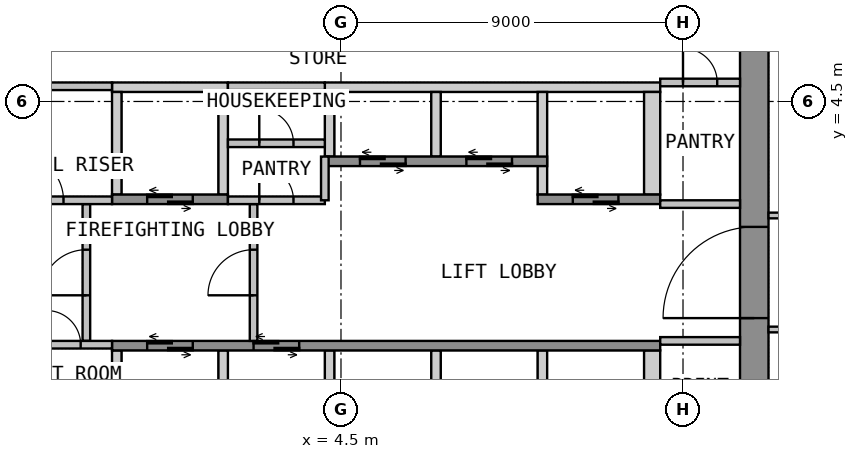
"""IFC4 building model, lengths in metres.
Left out: names, types, materials, properties, quantities, classifications, styles, units other than length and angle.
Written with IfcOpenShell. Run it as: python <this file> out.ifc"""

import sys

from ifc_helpers import new_model, si_unit, direction, frame, frame_2d, origin, place, context, subcontext, project, spatial, polyline, rectangle, outline, extrude, element, fill, save


model = new_model("IFC4")
c1 = context("Model", 3, precision=1e-05, world=origin(), true_north=direction((0.0, 1.0)))
c2 = subcontext(c1, "Body", "Model", "MODEL_VIEW")
j1 = project(units=[si_unit("LENGTHUNIT", "METRE"), si_unit("PLANEANGLEUNIT", "RADIAN")], contexts=[c1])
p1 = place(None, origin())
s1 = spatial("IfcSite", under=j1, at=p1, CompositionType="ELEMENT")
p2 = place(p1, origin())
s2 = spatial("IfcBuilding", under=s1, at=p2, CompositionType="ELEMENT")
p3 = place(p2, frame((0.0, 0.0, 144.3)))
s3 = spatial("IfcBuildingStorey", under=s2, at=p3, CompositionType="ELEMENT", Elevation=144.3)
p4 = place(p3, frame((15.375, -12.75, 0.0), z_axis=(0.0, 0.0, 1.0), x_axis=(0.0, 1.0, 0.0)))
e1 = element("IfcWall", 1, at=p4, inside=s3, PredefinedType="SHEAR", context=c2, shape_type="SweptSolid", body=[
    extrude(rectangle(XDim=25.5, YDim=0.75, at=frame_2d((12.75, 0.0))), origin(), (0.0, 0.0, 1.0), 3.575),
])
p5 = place(p4, frame((11.55, 0.0, 0.0)))
e2 = element("IfcOpeningElement", 2, at=p5, cuts=e1, PredefinedType="OPENING", context=c2, shape_type="SweptSolid", body=[
    extrude(rectangle(XDim=2.4, YDim=2.1, at=frame_2d((1.2, 1.05))), frame((0.0, 0.385, 0.0), z_axis=(0.0, -1.0, 0.0), x_axis=(1.0, 0.0, 0.0)), (0.0, 0.0, 1.0), 0.77),
])
p6 = place(p3, origin())
e3 = element("IfcWall", 3, at=p6, inside=s3, PredefinedType="SHEAR", context=c2, shape_type="SweptSolid", body=[
    extrude(outline(polyline([(-1.525, 4.75), (1.525, 4.75), (1.525, 5.0), (-1.525, 5.0), (-1.525, 4.75)])), origin(), (0.0, 0.0, 1.0), 3.575),
])
p7 = place(p3, origin())
e4 = element("IfcWall", 4, at=p7, inside=s3, PredefinedType="SHEAR", context=c2, shape_type="SweptSolid", body=[
    extrude(outline(polyline([(4.075, 4.75), (12.9, 4.75), (12.9, 5.0), (4.075, 5.0), (4.075, 4.75)])), origin(), (0.0, 0.0, 1.0), 3.575),
])
p8 = place(p3, origin())
e5 = element("IfcWall", 5, at=p8, inside=s3, PredefinedType="SHEAR", context=c2, shape_type="SweptSolid", body=[
    extrude(outline(polyline([(-1.525, 2.05), (-1.275, 2.05), (-1.275, 4.75), (-1.525, 4.75), (-1.525, 2.05)])), origin(), (0.0, 0.0, 1.0), 3.575),
])
p9 = place(p3, origin())
e6 = element("IfcWall", 6, at=p9, inside=s3, PredefinedType="SHEAR", context=c2, shape_type="SweptSolid", body=[
    extrude(outline(polyline([(1.275, 2.05), (1.525, 2.05), (1.525, 4.75), (1.275, 4.75), (1.275, 2.05)])), origin(), (0.0, 0.0, 1.0), 3.575),
])
p10 = place(p3, origin())
e7 = element("IfcWall", 7, at=p10, inside=s3, PredefinedType="SHEAR", context=c2, shape_type="SweptSolid", body=[
    extrude(outline(polyline([(9.675, 2.05), (9.925, 2.05), (9.925, 4.75), (9.675, 4.75), (9.675, 2.05)])), origin(), (0.0, 0.0, 1.0), 3.575),
])
p11 = place(p3, origin())
e8 = element("IfcWall", 8, at=p11, inside=s3, PredefinedType="SHEAR", context=c2, shape_type="SweptSolid", body=[
    extrude(outline(polyline([(12.475, 2.05), (12.9, 2.05), (12.9, 4.75), (12.475, 4.75), (12.475, 2.05)])), origin(), (0.0, 0.0, 1.0), 3.575),
])
p12 = place(p3, origin())
e9 = element("IfcWall", 9, at=p12, inside=s3, PredefinedType="SHEAR", context=c2, shape_type="SweptSolid", body=[
    extrude(outline(polyline([(4.075, 3.05), (4.325, 3.05), (4.325, 4.75), (4.075, 4.75), (4.075, 3.05)])), origin(), (0.0, 0.0, 1.0), 3.575),
])
p13 = place(p3, origin())
e10 = element("IfcWall", 10, at=p13, inside=s3, PredefinedType="SHEAR", context=c2, shape_type="SweptSolid", body=[
    extrude(outline(polyline([(6.875, 3.05), (7.125, 3.05), (7.125, 4.75), (6.875, 4.75), (6.875, 3.05)])), origin(), (0.0, 0.0, 1.0), 3.575),
])
p14 = place(p3, frame((-1.525, 1.925, 0.0), z_axis=(0.0, 0.0, 1.0), x_axis=(1.0, 0.0, 0.0)))
e11 = element("IfcWall", 11, at=p14, inside=s3, PredefinedType="SHEAR", context=c2, shape_type="SweptSolid", body=[
    extrude(rectangle(XDim=3.05, YDim=0.25, at=frame_2d((1.525, 0.0))), origin(), (0.0, 0.0, 1.0), 3.575),
])
p15 = place(p14, frame((0.925, 0.0, 0.0)))
e12 = element("IfcOpeningElement", 12, at=p15, cuts=e11, PredefinedType="OPENING", context=c2, shape_type="SweptSolid", body=[
    extrude(rectangle(XDim=1.2, YDim=2.1, at=frame_2d((0.6, 1.05))), frame((0.0, 0.135, 0.0), z_axis=(0.0, -1.0, 0.0), x_axis=(1.0, 0.0, 0.0)), (0.0, 0.0, 1.0), 0.27),
])
p16 = place(p3, frame((4.075, 2.925, 0.0), z_axis=(0.0, 0.0, 1.0), x_axis=(1.0, 0.0, 0.0)))
e13 = element("IfcWall", 13, at=p16, inside=s3, PredefinedType="SHEAR", context=c2, shape_type="SweptSolid", body=[
    extrude(rectangle(XDim=5.85, YDim=0.25, at=frame_2d((2.925, 0.0))), origin(), (0.0, 0.0, 1.0), 3.575),
])
p17 = place(p16, frame((0.925, 0.0, 0.0)))
e14 = element("IfcOpeningElement", 14, at=p17, cuts=e13, PredefinedType="OPENING", context=c2, shape_type="SweptSolid", body=[
    extrude(rectangle(XDim=1.2, YDim=2.1, at=frame_2d((0.6, 1.05))), frame((0.0, 0.135, 0.0), z_axis=(0.0, -1.0, 0.0), x_axis=(1.0, 0.0, 0.0)), (0.0, 0.0, 1.0), 0.27),
])
p18 = place(p16, frame((3.725, 0.0, 0.0)))
e15 = element("IfcOpeningElement", 15, at=p18, cuts=e13, PredefinedType="OPENING", context=c2, shape_type="SweptSolid", body=[
    extrude(rectangle(XDim=1.2, YDim=2.1, at=frame_2d((0.6, 1.05))), frame((0.0, 0.135, 0.0), z_axis=(0.0, -1.0, 0.0), x_axis=(1.0, 0.0, 0.0)), (0.0, 0.0, 1.0), 0.27),
])
p19 = place(p3, frame((9.675, 1.925, 0.0), z_axis=(0.0, 0.0, 1.0), x_axis=(1.0, 0.0, 0.0)))
e16 = element("IfcWall", 16, at=p19, inside=s3, PredefinedType="SHEAR", context=c2, shape_type="SweptSolid", body=[
    extrude(rectangle(XDim=3.225, YDim=0.25, at=frame_2d((1.612, 0.0))), origin(), (0.0, 0.0, 1.0), 3.575),
])
p20 = place(p19, frame((0.925, 0.0, 0.0)))
e17 = element("IfcOpeningElement", 17, at=p20, cuts=e16, PredefinedType="OPENING", context=c2, shape_type="SweptSolid", body=[
    extrude(rectangle(XDim=1.2, YDim=2.1, at=frame_2d((0.6, 1.05))), frame((0.0, 0.135, 0.0), z_axis=(0.0, -1.0, 0.0), x_axis=(1.0, 0.0, 0.0)), (0.0, 0.0, 1.0), 0.27),
])
p21 = place(p3, origin())
e18 = element("IfcWall", 18, at=p21, inside=s3, PredefinedType="SHEAR", context=c2, shape_type="SweptSolid", body=[
    extrude(outline(polyline([(-1.525, -4.75), (-1.275, -4.75), (-1.275, -2.05), (-1.525, -2.05), (-1.525, -4.75)])), origin(), (0.0, 0.0, 1.0), 3.575),
])
p22 = place(p3, origin())
e19 = element("IfcWall", 19, at=p22, inside=s3, PredefinedType="SHEAR", context=c2, shape_type="SweptSolid", body=[
    extrude(outline(polyline([(1.275, -4.75), (1.525, -4.75), (1.525, -2.05), (1.275, -2.05), (1.275, -4.75)])), origin(), (0.0, 0.0, 1.0), 3.575),
])
p23 = place(p3, origin())
e20 = element("IfcWall", 20, at=p23, inside=s3, PredefinedType="SHEAR", context=c2, shape_type="SweptSolid", body=[
    extrude(outline(polyline([(4.075, -4.75), (4.325, -4.75), (4.325, -2.05), (4.075, -2.05), (4.075, -4.75)])), origin(), (0.0, 0.0, 1.0), 3.575),
])
p24 = place(p3, origin())
e21 = element("IfcWall", 21, at=p24, inside=s3, PredefinedType="SHEAR", context=c2, shape_type="SweptSolid", body=[
    extrude(outline(polyline([(6.875, -4.75), (7.125, -4.75), (7.125, -2.05), (6.875, -2.05), (6.875, -4.75)])), origin(), (0.0, 0.0, 1.0), 3.575),
])
p25 = place(p3, origin())
e22 = element("IfcWall", 22, at=p25, inside=s3, PredefinedType="SHEAR", context=c2, shape_type="SweptSolid", body=[
    extrude(outline(polyline([(9.675, -4.75), (9.925, -4.75), (9.925, -2.05), (9.675, -2.05), (9.675, -4.75)])), origin(), (0.0, 0.0, 1.0), 3.575),
])
p26 = place(p3, origin())
e23 = element("IfcWall", 23, at=p26, inside=s3, PredefinedType="SHEAR", context=c2, shape_type="SweptSolid", body=[
    extrude(outline(polyline([(12.475, -4.75), (12.9, -4.75), (12.9, -2.05), (12.475, -2.05), (12.475, -4.75)])), origin(), (0.0, 0.0, 1.0), 3.575),
])
p27 = place(p3, frame((-1.525, -1.925, 0.0), z_axis=(0.0, 0.0, 1.0), x_axis=(1.0, 0.0, 0.0)))
e24 = element("IfcWall", 24, at=p27, inside=s3, PredefinedType="SHEAR", context=c2, shape_type="SweptSolid", body=[
    extrude(rectangle(XDim=14.425, YDim=0.25, at=frame_2d((7.212, 0.0))), origin(), (0.0, 0.0, 1.0), 3.575),
])
p28 = place(p27, frame((0.925, 0.0, 0.0)))
e25 = element("IfcOpeningElement", 25, at=p28, cuts=e24, PredefinedType="OPENING", context=c2, shape_type="SweptSolid", body=[
    extrude(rectangle(XDim=1.2, YDim=2.1, at=frame_2d((0.6, 1.05))), frame((0.0, 0.135, 0.0), z_axis=(0.0, -1.0, 0.0), x_axis=(1.0, 0.0, 0.0)), (0.0, 0.0, 1.0), 0.27),
])
p29 = place(p27, frame((3.725, 0.0, 0.0)))
e26 = element("IfcOpeningElement", 26, at=p29, cuts=e24, PredefinedType="OPENING", context=c2, shape_type="SweptSolid", body=[
    extrude(rectangle(XDim=1.2, YDim=2.1, at=frame_2d((0.6, 1.05))), frame((0.0, 0.135, 0.0), z_axis=(0.0, -1.0, 0.0), x_axis=(1.0, 0.0, 0.0)), (0.0, 0.0, 1.0), 0.27),
])
p30 = place(p3, frame((-2.2, -1.8, 0.0), z_axis=(0.0, 0.0, 1.0), x_axis=(0.0, 1.0, 0.0)))
e27 = element("IfcWall", 27, at=p30, inside=s3, PredefinedType="PARTITIONING", context=c2, shape_type="SweptSolid", body=[
    extrude(rectangle(XDim=3.6, YDim=0.2, at=frame_2d((1.8, 0.0))), origin(), (0.0, 0.0, 1.0), 3.575),
])
p31 = place(p30, frame((1.2, 0.0, 0.0)))
e28 = element("IfcOpeningElement", 28, at=p31, cuts=e27, PredefinedType="OPENING", context=c2, shape_type="SweptSolid", body=[
    extrude(rectangle(XDim=1.2, YDim=2.1, at=frame_2d((0.6, 1.05))), frame((0.0, 0.11, 0.0), z_axis=(0.0, -1.0, 0.0), x_axis=(1.0, 0.0, 0.0)), (0.0, 0.0, 1.0), 0.22),
])
p32 = place(p3, frame((2.2, -1.8, 0.0), z_axis=(0.0, 0.0, 1.0), x_axis=(0.0, 1.0, 0.0)))
e29 = element("IfcWall", 29, at=p32, inside=s3, PredefinedType="PARTITIONING", context=c2, shape_type="SweptSolid", body=[
    extrude(rectangle(XDim=3.6, YDim=0.2, at=frame_2d((1.8, 0.0))), origin(), (0.0, 0.0, 1.0), 3.575),
])
p33 = place(p32, frame((1.2, 0.0, 0.0)))
e30 = element("IfcOpeningElement", 30, at=p33, cuts=e29, PredefinedType="OPENING", context=c2, shape_type="SweptSolid", body=[
    extrude(rectangle(XDim=1.2, YDim=2.1, at=frame_2d((0.6, 1.05))), frame((0.0, 0.11, 0.0), z_axis=(0.0, -1.0, 0.0), x_axis=(1.0, 0.0, 0.0)), (0.0, 0.0, 1.0), 0.22),
])
p34 = place(p3, frame((12.9, 5.0, 0.0), z_axis=(0.0, 0.0, 1.0), x_axis=(1.0, 0.0, 0.0)))
e31 = element("IfcWall", 31, at=p34, inside=s3, PredefinedType="PARTITIONING", context=c2, shape_type="SweptSolid", body=[
    extrude(rectangle(XDim=2.1, YDim=0.2, at=frame_2d((1.05, 0.0))), origin(), (0.0, 0.0, 1.0), 3.575),
])
p35 = place(p34, frame((0.6, 0.0, 0.0)))
e32 = element("IfcOpeningElement", 32, at=p35, cuts=e31, PredefinedType="OPENING", context=c2, shape_type="SweptSolid", body=[
    extrude(rectangle(XDim=0.9, YDim=2.1, at=frame_2d((0.45, 1.05))), frame((0.0, 0.11, 0.0), z_axis=(0.0, -1.0, 0.0), x_axis=(1.0, 0.0, 0.0)), (0.0, 0.0, 1.0), 0.22),
])
for number, where, z_axis, x_axis in (
    (33, (12.9, 1.8, 0.0), (0.0, 0.0, 1.0), (1.0, 0.0, 0.0)),
    (34, (12.9, -1.8, 0.0), (0.0, 0.0, 1.0), (1.0, 0.0, 0.0)),
):
    element("IfcWall", number, at=place(p3, frame(where, z_axis=z_axis, x_axis=x_axis)), inside=s3, PredefinedType="PARTITIONING", context=c2, shape_type="SweptSolid", body=[
        extrude(rectangle(XDim=2.1, YDim=0.2, at=frame_2d((1.05, 0.0))), origin(), (0.0, 0.0, 1.0), 3.575),
    ])
p36 = place(p3, frame((-12.9, 1.9, 0.0), z_axis=(0.0, 0.0, 1.0), x_axis=(1.0, 0.0, 0.0)))
e35 = element("IfcWall", 35, at=p36, inside=s3, PredefinedType="PARTITIONING", context=c2, shape_type="SweptSolid", body=[
    extrude(rectangle(XDim=11.375, YDim=0.2, at=frame_2d((5.688, 0.0))), origin(), (0.0, 0.0, 1.0), 3.575),
])
p37 = place(p36, frame((1.334, 0.0, 0.0)))
e36 = element("IfcOpeningElement", 36, at=p37, cuts=e35, PredefinedType="OPENING", context=c2, shape_type="SweptSolid", body=[
    extrude(rectangle(XDim=1.2, YDim=2.1, at=frame_2d((0.6, 1.05))), frame((0.0, 0.11, 0.0), z_axis=(0.0, -1.0, 0.0), x_axis=(1.0, 0.0, 0.0)), (0.0, 0.0, 1.0), 0.22),
])
p38 = place(p36, frame((5.144, 0.0, 0.0)))
e37 = element("IfcOpeningElement", 37, at=p38, cuts=e35, PredefinedType="OPENING", context=c2, shape_type="SweptSolid", body=[
    extrude(rectangle(XDim=1.2, YDim=2.1, at=frame_2d((0.6, 1.05))), frame((0.0, 0.11, 0.0), z_axis=(0.0, -1.0, 0.0), x_axis=(1.0, 0.0, 0.0)), (0.0, 0.0, 1.0), 0.22),
])
p39 = place(p36, frame((8.898, 0.0, 0.0)))
e38 = element("IfcOpeningElement", 38, at=p39, cuts=e35, PredefinedType="OPENING", context=c2, shape_type="SweptSolid", body=[
    extrude(rectangle(XDim=1.2, YDim=2.1, at=frame_2d((0.6, 1.05))), frame((0.0, 0.11, 0.0), z_axis=(0.0, -1.0, 0.0), x_axis=(1.0, 0.0, 0.0)), (0.0, 0.0, 1.0), 0.22),
])
p40 = place(p3, frame((-12.9, 4.9, 0.0), z_axis=(0.0, 0.0, 1.0), x_axis=(1.0, 0.0, 0.0)))
e39 = element("IfcWall", 39, at=p40, inside=s3, PredefinedType="PARTITIONING", context=c2, shape_type="SweptSolid", body=[
    extrude(rectangle(XDim=11.375, YDim=0.2, at=frame_2d((5.688, 0.0))), origin(), (0.0, 0.0, 1.0), 3.575),
])
p41 = place(p3, frame((1.525, 3.4, 0.0), z_axis=(0.0, 0.0, 1.0), x_axis=(1.0, 0.0, 0.0)))
e40 = element("IfcWall", 40, at=p41, inside=s3, PredefinedType="PARTITIONING", context=c2, shape_type="SweptSolid", body=[
    extrude(rectangle(XDim=2.55, YDim=0.2, at=frame_2d((1.275, 0.0))), origin(), (0.0, 0.0, 1.0), 3.575),
])
p42 = place(p41, frame((0.825, 0.0, 0.0)))
e41 = element("IfcOpeningElement", 41, at=p42, cuts=e40, PredefinedType="OPENING", context=c2, shape_type="SweptSolid", body=[
    extrude(rectangle(XDim=0.9, YDim=2.1, at=frame_2d((0.45, 1.05))), frame((0.0, 0.11, 0.0), z_axis=(0.0, -1.0, 0.0), x_axis=(1.0, 0.0, 0.0)), (0.0, 0.0, 1.0), 0.22),
])
p43 = place(p3, frame((1.525, 1.9, 0.0), z_axis=(0.0, 0.0, 1.0), x_axis=(1.0, 0.0, 0.0)))
e42 = element("IfcWall", 42, at=p43, inside=s3, PredefinedType="PARTITIONING", context=c2, shape_type="SweptSolid", body=[
    extrude(rectangle(XDim=2.55, YDim=0.2, at=frame_2d((1.275, 0.0))), origin(), (0.0, 0.0, 1.0), 3.575),
])
p44 = place(p43, frame((0.825, 0.0, 0.0)))
e43 = element("IfcOpeningElement", 43, at=p44, cuts=e42, PredefinedType="OPENING", context=c2, shape_type="SweptSolid", body=[
    extrude(rectangle(XDim=0.9, YDim=2.1, at=frame_2d((0.45, 1.05))), frame((0.0, 0.11, 0.0), z_axis=(0.0, -1.0, 0.0), x_axis=(1.0, 0.0, 0.0)), (0.0, 0.0, 1.0), 0.22),
])
p45 = place(p3, frame((1.525, 4.9, 0.0), z_axis=(0.0, 0.0, 1.0), x_axis=(1.0, 0.0, 0.0)))
e44 = element("IfcWall", 44, at=p45, inside=s3, PredefinedType="PARTITIONING", context=c2, shape_type="SweptSolid", body=[
    extrude(rectangle(XDim=2.55, YDim=0.2, at=frame_2d((1.275, 0.0))), origin(), (0.0, 0.0, 1.0), 3.575),
])
p46 = place(p3, frame((4.075, 1.9, 0.0), z_axis=(0.0, 0.0, 1.0), x_axis=(0.0, 1.0, 0.0)))
e45 = element("IfcWall", 45, at=p46, inside=s3, PredefinedType="PARTITIONING", context=c2, shape_type="SweptSolid", body=[
    extrude(rectangle(XDim=1.15, YDim=0.2, at=frame_2d((0.575, 0.0))), origin(), (0.0, 0.0, 1.0), 3.575),
])
p47 = place(p3, frame((-4.075, -1.9, 0.0), z_axis=(0.0, 0.0, 1.0), x_axis=(1.0, 0.0, 0.0)))
e46 = element("IfcWall", 46, at=p47, inside=s3, PredefinedType="PARTITIONING", context=c2, shape_type="SweptSolid", body=[
    extrude(rectangle(XDim=2.55, YDim=0.2, at=frame_2d((1.275, 0.0))), origin(), (0.0, 0.0, 1.0), 3.575),
])
p48 = place(p47, frame((0.825, 0.0, 0.0)))
e47 = element("IfcOpeningElement", 47, at=p48, cuts=e46, PredefinedType="OPENING", context=c2, shape_type="SweptSolid", body=[
    extrude(rectangle(XDim=0.9, YDim=2.1, at=frame_2d((0.45, 1.05))), frame((0.0, 0.11, 0.0), z_axis=(0.0, -1.0, 0.0), x_axis=(1.0, 0.0, 0.0)), (0.0, 0.0, 1.0), 0.22),
])
for number, where, z_axis, x_axis in (
    (48, (15.75, -1.5, 0.0), (0.0, 0.0, 1.0), (1.0, 0.0, 0.0)),
    (49, (18.825, 1.5, 0.0), (0.0, 0.0, 1.0), (-1.0, 0.0, 0.0)),
):
    element("IfcWall", number, at=place(p3, frame(where, z_axis=z_axis, x_axis=x_axis)), inside=s3, PredefinedType="PARTITIONING", context=c2, shape_type="SweptSolid", body=[
        extrude(rectangle(XDim=3.075, YDim=0.15, at=frame_2d((1.538, 0.0))), origin(), (0.0, 0.0, 1.0), 3.575),
    ])
p49 = place(p5, origin())
e50 = element("IfcDoor", 50, at=p49, inside=s3, OperationType="DOUBLE_DOOR_DOUBLE_SWING", PredefinedType="DOOR", context=c2, shape_type="SweptSolid", body=[
    extrude(rectangle(XDim=2.4, YDim=2.1, at=frame_2d((1.2, 1.05))), frame((0.0, 0.025, 0.0), z_axis=(0.0, -1.0, 0.0), x_axis=(1.0, 0.0, 0.0)), (0.0, 0.0, 1.0), 0.05),
])
fill(e2, e50)
p50 = place(p15, origin())
e51 = element("IfcDoor", 51, at=p50, inside=s3, OperationType="DOUBLE_DOOR_SLIDING", PredefinedType="DOOR", context=c2, shape_type="SweptSolid", body=[
    extrude(rectangle(XDim=1.2, YDim=2.1, at=frame_2d((0.6, 1.05))), frame((0.0, 0.025, 0.0), z_axis=(0.0, -1.0, 0.0), x_axis=(1.0, 0.0, 0.0)), (0.0, 0.0, 1.0), 0.05),
])
fill(e12, e51)
p51 = place(p17, origin())
e52 = element("IfcDoor", 52, at=p51, inside=s3, OperationType="DOUBLE_DOOR_SLIDING", PredefinedType="DOOR", context=c2, shape_type="SweptSolid", body=[
    extrude(rectangle(XDim=1.2, YDim=2.1, at=frame_2d((0.6, 1.05))), frame((0.0, 0.025, 0.0), z_axis=(0.0, -1.0, 0.0), x_axis=(1.0, 0.0, 0.0)), (0.0, 0.0, 1.0), 0.05),
])
fill(e14, e52)
p52 = place(p18, origin())
e53 = element("IfcDoor", 53, at=p52, inside=s3, OperationType="DOUBLE_DOOR_SLIDING", PredefinedType="DOOR", context=c2, shape_type="SweptSolid", body=[
    extrude(rectangle(XDim=1.2, YDim=2.1, at=frame_2d((0.6, 1.05))), frame((0.0, 0.025, 0.0), z_axis=(0.0, -1.0, 0.0), x_axis=(1.0, 0.0, 0.0)), (0.0, 0.0, 1.0), 0.05),
])
fill(e15, e53)
p53 = place(p20, origin())
e54 = element("IfcDoor", 54, at=p53, inside=s3, OperationType="DOUBLE_DOOR_SLIDING", PredefinedType="DOOR", context=c2, shape_type="SweptSolid", body=[
    extrude(rectangle(XDim=1.2, YDim=2.1, at=frame_2d((0.6, 1.05))), frame((0.0, 0.025, 0.0), z_axis=(0.0, -1.0, 0.0), x_axis=(1.0, 0.0, 0.0)), (0.0, 0.0, 1.0), 0.05),
])
fill(e17, e54)
p54 = place(p28, origin())
e55 = element("IfcDoor", 55, at=p54, inside=s3, OperationType="DOUBLE_DOOR_SLIDING", PredefinedType="DOOR", context=c2, shape_type="SweptSolid", body=[
    extrude(rectangle(XDim=1.2, YDim=2.1, at=frame_2d((0.6, 1.05))), frame((0.0, 0.025, 0.0), z_axis=(0.0, -1.0, 0.0), x_axis=(1.0, 0.0, 0.0)), (0.0, 0.0, 1.0), 0.05),
])
fill(e25, e55)
p55 = place(p29, origin())
e56 = element("IfcDoor", 56, at=p55, inside=s3, OperationType="DOUBLE_DOOR_SLIDING", PredefinedType="DOOR", context=c2, shape_type="SweptSolid", body=[
    extrude(rectangle(XDim=1.2, YDim=2.1, at=frame_2d((0.6, 1.05))), frame((0.0, 0.025, 0.0), z_axis=(0.0, -1.0, 0.0), x_axis=(1.0, 0.0, 0.0)), (0.0, 0.0, 1.0), 0.05),
])
fill(e26, e56)
p56 = place(p31, origin())
e57 = element("IfcDoor", 57, at=p56, inside=s3, OperationType="SINGLE_SWING_LEFT", PredefinedType="DOOR", context=c2, shape_type="SweptSolid", body=[
    extrude(rectangle(XDim=1.2, YDim=2.1, at=frame_2d((0.6, 1.05))), frame((0.0, 0.025, 0.0), z_axis=(0.0, -1.0, 0.0), x_axis=(1.0, 0.0, 0.0)), (0.0, 0.0, 1.0), 0.05),
])
fill(e28, e57)
p57 = place(p33, origin())
e58 = element("IfcDoor", 58, at=p57, inside=s3, OperationType="SINGLE_SWING_LEFT", PredefinedType="DOOR", context=c2, shape_type="SweptSolid", body=[
    extrude(rectangle(XDim=1.2, YDim=2.1, at=frame_2d((0.6, 1.05))), frame((0.0, 0.025, 0.0), z_axis=(0.0, -1.0, 0.0), x_axis=(1.0, 0.0, 0.0)), (0.0, 0.0, 1.0), 0.05),
])
fill(e30, e58)
p58 = place(p35, origin())
e59 = element("IfcDoor", 59, at=p58, inside=s3, OperationType="SINGLE_SWING_LEFT", PredefinedType="DOOR", context=c2, shape_type="SweptSolid", body=[
    extrude(rectangle(XDim=0.9, YDim=2.1, at=frame_2d((0.45, 1.05))), frame((0.0, 0.025, 0.0), z_axis=(0.0, -1.0, 0.0), x_axis=(1.0, 0.0, 0.0)), (0.0, 0.0, 1.0), 0.05),
])
fill(e32, e59)
p59 = place(p39, origin())
e60 = element("IfcDoor", 60, at=p59, inside=s3, OperationType="SINGLE_SWING_RIGHT", PredefinedType="DOOR", context=c2, shape_type="SweptSolid", body=[
    extrude(rectangle(XDim=1.2, YDim=2.1, at=frame_2d((0.6, 1.05))), frame((0.0, 0.025, 0.0), z_axis=(0.0, -1.0, 0.0), x_axis=(1.0, 0.0, 0.0)), (0.0, 0.0, 1.0), 0.05),
])
fill(e38, e60)
p60 = place(p42, origin())
e61 = element("IfcDoor", 61, at=p60, inside=s3, OperationType="SINGLE_SWING_LEFT", PredefinedType="DOOR", context=c2, shape_type="SweptSolid", body=[
    extrude(rectangle(XDim=0.9, YDim=2.1, at=frame_2d((0.45, 1.05))), frame((0.0, 0.025, 0.0), z_axis=(0.0, -1.0, 0.0), x_axis=(1.0, 0.0, 0.0)), (0.0, 0.0, 1.0), 0.05),
])
fill(e41, e61)
p61 = place(p44, origin())
e62 = element("IfcDoor", 62, at=p61, inside=s3, OperationType="SINGLE_SWING_LEFT", PredefinedType="DOOR", context=c2, shape_type="SweptSolid", body=[
    extrude(rectangle(XDim=0.9, YDim=2.1, at=frame_2d((0.45, 1.05))), frame((0.0, 0.025, 0.0), z_axis=(0.0, -1.0, 0.0), x_axis=(1.0, 0.0, 0.0)), (0.0, 0.0, 1.0), 0.05),
])
fill(e43, e62)
p62 = place(p48, origin())
e63 = element("IfcDoor", 63, at=p62, inside=s3, OperationType="SINGLE_SWING_LEFT", PredefinedType="DOOR", context=c2, shape_type="SweptSolid", body=[
    extrude(rectangle(XDim=0.9, YDim=2.1, at=frame_2d((0.45, 1.05))), frame((0.0, 0.025, 0.0), z_axis=(0.0, -1.0, 0.0), x_axis=(1.0, 0.0, 0.0)), (0.0, 0.0, 1.0), 0.05),
])
fill(e47, e63)
save(model, sys.argv[1])
